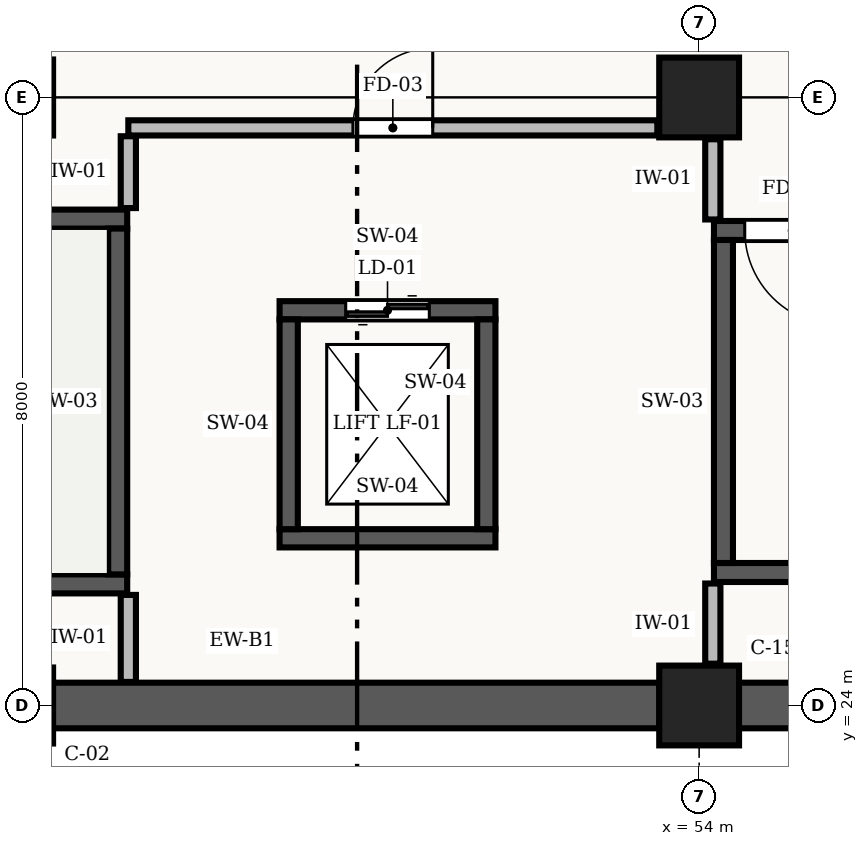
"""IFC4 building model, lengths in metres.
Left out: names, types, materials, properties, quantities, classifications, styles, units other than length and angle.
Written with IfcOpenShell. Run it as: python <this file> out.ifc"""

import sys

from ifc_helpers import new_model, si_unit, direction, frame, frame_2d, origin, origin_2d, place, context, subcontext, project, spatial, rectangle, extrude, element, fill, save


model = new_model("IFC4")
c1 = context("Model", 3, precision=1e-05, world=origin(), true_north=direction((0.0, 1.0)))
c2 = subcontext(c1, "Body", "Model", "MODEL_VIEW")
j1 = project(units=[si_unit("LENGTHUNIT", "METRE"), si_unit("PLANEANGLEUNIT", "RADIAN")], contexts=[c1])
p1 = place(None, origin())
s1 = spatial("IfcSite", under=j1, at=p1, CompositionType="ELEMENT")
p2 = place(p1, origin())
s2 = spatial("IfcBuilding", under=s1, at=p2, CompositionType="ELEMENT")
p3 = place(p2, frame((0.0, 0.0, -12.0)))
s3 = spatial("IfcBuildingStorey", under=s2, at=p3, CompositionType="ELEMENT", Elevation=-12.0)
for number, where, z_axis, x_axis in (
    (1, (45.0, 24.0, 0.0), (0.0, 0.0, 1.0), (1.0, 0.0, 0.0)),
    (2, (45.0, 32.0, 0.0), (0.0, 0.0, 1.0), (1.0, 0.0, 0.0)),
):
    element("IfcColumn", number, at=place(p3, frame(where, z_axis=z_axis, x_axis=x_axis)), inside=s3, PredefinedType="COLUMN", context=c2, shape_type="SweptSolid", body=[
        extrude(rectangle(XDim=1.0, YDim=1.0, at=origin_2d()), origin(), (0.0, 0.0, 1.0), 6.0),
    ])
for number, where, z_axis, x_axis in (
    (3, (54.0, 24.0, 0.0), (0.0, 0.0, 1.0), (1.0, 0.0, 0.0)),
    (4, (54.0, 32.0, 0.0), (0.0, 0.0, 1.0), (1.0, 0.0, 0.0)),
):
    element("IfcColumn", number, at=place(p3, frame(where, z_axis=z_axis, x_axis=x_axis)), inside=s3, PredefinedType="COLUMN", context=c2, shape_type="SweptSolid", body=[
        extrude(rectangle(XDim=1.05, YDim=1.05, at=origin_2d()), origin(), (0.0, 0.0, 1.0), 6.0),
    ])
for number, where, z_axis, x_axis in (
    (5, (62.502, 24.0, 0.0), (0.0, 0.0, 1.0), (-1.0, 0.0, 0.0)),
    (6, (53.477, 24.0, 0.0), (0.0, 0.0, 1.0), (-1.0, 0.0, 0.0)),
):
    element("IfcWall", number, at=place(p3, frame(where, z_axis=z_axis, x_axis=x_axis)), inside=s3, PredefinedType="STANDARD", context=c2, shape_type="SweptSolid", body=[
        extrude(rectangle(XDim=7.979, YDim=0.6, at=frame_2d((3.99, 0.0))), origin(), (0.0, 0.0, 1.0), 5.54),
    ])
p4 = place(p3, frame((36.975, 25.6, 0.0), z_axis=(0.0, 0.0, 1.0), x_axis=(1.0, 0.0, 0.0)))
e7 = element("IfcWall", 7, at=p4, inside=s3, PredefinedType="SHEAR", context=c2, shape_type="SweptSolid", body=[
    extrude(rectangle(XDim=9.5, YDim=0.25, at=frame_2d((4.75, 0.0))), origin(), (0.0, 0.0, 1.0), 5.53),
])
p5 = place(p3, frame((46.475, 30.4, 0.0), z_axis=(0.0, 0.0, 1.0), x_axis=(-1.0, 0.0, 0.0)))
e8 = element("IfcWall", 8, at=p5, inside=s3, PredefinedType="SHEAR", context=c2, shape_type="SweptSolid", body=[
    extrude(rectangle(XDim=9.5, YDim=0.25, at=frame_2d((4.75, 0.0))), origin(), (0.0, 0.0, 1.0), 5.53),
])
p6 = place(p5, frame((7.805, 0.0, 0.0)))
e9 = element("IfcOpeningElement", 9, at=p6, cuts=e8, PredefinedType="OPENING", context=c2, shape_type="SweptSolid", body=[
    extrude(rectangle(XDim=1.25, YDim=2.15, at=frame_2d((0.625, 1.075))), frame((0.0, 0.137, 0.0), z_axis=(0.0, -1.0, 0.0), x_axis=(1.0, 0.0, 0.0)), (0.0, 0.0, 1.0), 0.274),
])
p7 = place(p3, frame((46.35, 25.725, 0.0), z_axis=(0.0, 0.0, 1.0), x_axis=(0.0, 1.0, 0.0)))
e10 = element("IfcWall", 10, at=p7, inside=s3, PredefinedType="SHEAR", context=c2, shape_type="SweptSolid", body=[
    extrude(rectangle(XDim=4.55, YDim=0.25, at=frame_2d((2.275, 0.0))), origin(), (0.0, 0.0, 1.0), 5.53),
])
p8 = place(p3, frame((54.195, 25.75, 0.0), z_axis=(0.0, 0.0, 1.0), x_axis=(1.0, 0.0, 0.0)))
e11 = element("IfcWall", 11, at=p8, inside=s3, PredefinedType="SHEAR", context=c2, shape_type="SweptSolid", body=[
    extrude(rectangle(XDim=8.49, YDim=0.25, at=frame_2d((4.245, 0.0))), origin(), (0.0, 0.0, 1.0), 5.53),
])
p9 = place(p3, frame((62.685, 30.25, 0.0), z_axis=(0.0, 0.0, 1.0), x_axis=(-1.0, 0.0, 0.0)))
e12 = element("IfcWall", 12, at=p9, inside=s3, PredefinedType="SHEAR", context=c2, shape_type="SweptSolid", body=[
    extrude(rectangle(XDim=8.49, YDim=0.25, at=frame_2d((4.245, 0.0))), origin(), (0.0, 0.0, 1.0), 5.53),
])
p10 = place(p9, frame((6.835, 0.0, 0.0)))
e13 = element("IfcOpeningElement", 13, at=p10, cuts=e12, PredefinedType="OPENING", context=c2, shape_type="SweptSolid", body=[
    extrude(rectangle(XDim=1.25, YDim=2.15, at=frame_2d((0.625, 1.075))), frame((0.0, 0.137, 0.0), z_axis=(0.0, -1.0, 0.0), x_axis=(1.0, 0.0, 0.0)), (0.0, 0.0, 1.0), 0.274),
])
p11 = place(p3, frame((54.32, 30.125, 0.0), z_axis=(0.0, 0.0, 1.0), x_axis=(0.0, -1.0, 0.0)))
e14 = element("IfcWall", 14, at=p11, inside=s3, PredefinedType="SHEAR", context=c2, shape_type="SweptSolid", body=[
    extrude(rectangle(XDim=4.25, YDim=0.25, at=frame_2d((2.125, 0.0))), origin(), (0.0, 0.0, 1.0), 5.53),
])
p12 = place(p3, frame((48.48, 26.2, 0.0), z_axis=(0.0, 0.0, 1.0), x_axis=(1.0, 0.0, 0.0)))
e15 = element("IfcWall", 15, at=p12, inside=s3, PredefinedType="SHEAR", context=c2, shape_type="SweptSolid", body=[
    extrude(rectangle(XDim=2.84, YDim=0.24, at=frame_2d((1.42, 0.0))), origin(), (0.0, 0.0, 1.0), 5.53),
])
p13 = place(p3, frame((51.32, 29.2, 0.0), z_axis=(0.0, 0.0, 1.0), x_axis=(-1.0, 0.0, 0.0)))
e16 = element("IfcWall", 16, at=p13, inside=s3, PredefinedType="SHEAR", context=c2, shape_type="SweptSolid", body=[
    extrude(rectangle(XDim=2.84, YDim=0.24, at=frame_2d((1.42, 0.0))), origin(), (0.0, 0.0, 1.0), 5.53),
])
p14 = place(p13, frame((0.87, 0.0, 0.0)))
e17 = element("IfcOpeningElement", 17, at=p14, cuts=e16, PredefinedType="OPENING", context=c2, shape_type="SweptSolid", body=[
    extrude(rectangle(XDim=1.1, YDim=2.2, at=frame_2d((0.55, 1.1))), frame((0.0, 0.132, 0.0), z_axis=(0.0, -1.0, 0.0), x_axis=(1.0, 0.0, 0.0)), (0.0, 0.0, 1.0), 0.264),
])
for number, where, z_axis, x_axis in (
    (18, (48.6, 29.08, 0.0), (0.0, 0.0, 1.0), (0.0, -1.0, 0.0)),
    (19, (51.2, 26.32, 0.0), (0.0, 0.0, 1.0), (0.0, 1.0, 0.0)),
):
    element("IfcWall", number, at=place(p3, frame(where, z_axis=z_axis, x_axis=x_axis)), inside=s3, PredefinedType="SHEAR", context=c2, shape_type="SweptSolid", body=[
        extrude(rectangle(XDim=2.76, YDim=0.24, at=frame_2d((1.38, 0.0))), origin(), (0.0, 0.0, 1.0), 5.53),
    ])
p15 = place(p3, frame((46.49, 31.6, 0.0), z_axis=(0.0, 0.0, 1.0), x_axis=(1.0, 0.0, 0.0)))
e20 = element("IfcWall", 20, at=p15, inside=s3, PredefinedType="STANDARD", context=c2, shape_type="SweptSolid", body=[
    extrude(rectangle(XDim=6.96, YDim=0.2, at=frame_2d((3.48, 0.0))), origin(), (0.0, 0.0, 1.0), 5.53),
])
p16 = place(p15, frame((2.955, 0.0, 0.0)))
e21 = element("IfcOpeningElement", 21, at=p16, cuts=e20, PredefinedType="OPENING", context=c2, shape_type="SweptSolid", body=[
    extrude(rectangle(XDim=1.05, YDim=2.15, at=frame_2d((0.525, 1.075))), frame((0.0, 0.112, 0.0), z_axis=(0.0, -1.0, 0.0), x_axis=(1.0, 0.0, 0.0)), (0.0, 0.0, 1.0), 0.224),
])
p17 = place(p3, frame((46.49, 24.31, 0.0), z_axis=(0.0, 0.0, 1.0), x_axis=(0.0, 1.0, 0.0)))
e22 = element("IfcWall", 22, at=p17, inside=s3, PredefinedType="STANDARD", context=c2, shape_type="SweptSolid", body=[
    extrude(rectangle(XDim=1.145, YDim=0.2, at=frame_2d((0.573, 0.0))), origin(), (0.0, 0.0, 1.0), 5.53),
])
p18 = place(p3, frame((46.49, 30.545, 0.0), z_axis=(0.0, 0.0, 1.0), x_axis=(0.0, 1.0, 0.0)))
e23 = element("IfcWall", 23, at=p18, inside=s3, PredefinedType="STANDARD", context=c2, shape_type="SweptSolid", body=[
    extrude(rectangle(XDim=0.945, YDim=0.2, at=frame_2d((0.473, 0.0))), origin(), (0.0, 0.0, 1.0), 5.53),
])
for number, where, z_axis, x_axis in (
    (24, (54.18, 24.55, 0.0), (0.0, 0.0, 1.0), (0.0, 1.0, 0.0)),
    (25, (54.18, 30.395, 0.0), (0.0, 0.0, 1.0), (0.0, 1.0, 0.0)),
):
    element("IfcWall", number, at=place(p3, frame(where, z_axis=z_axis, x_axis=x_axis)), inside=s3, PredefinedType="STANDARD", context=c2, shape_type="SweptSolid", body=[
        extrude(rectangle(XDim=1.055, YDim=0.2, at=frame_2d((0.527, 0.0))), origin(), (0.0, 0.0, 1.0), 4.71),
    ])
p19 = place(p10, origin())
e26 = element("IfcDoor", 26, at=p19, inside=s3, OperationType="SINGLE_SWING_LEFT", PredefinedType="DOOR", context=c2, shape_type="SweptSolid", body=[
    extrude(rectangle(XDim=1.25, YDim=2.15, at=frame_2d((0.625, 1.075))), frame((0.0, 0.025, 0.0), z_axis=(0.0, -1.0, 0.0), x_axis=(1.0, 0.0, 0.0)), (0.0, 0.0, 1.0), 0.05),
])
fill(e13, e26)
p20 = place(p14, origin())
e27 = element("IfcDoor", 27, at=p20, inside=s3, OperationType="DOUBLE_DOOR_SLIDING", PredefinedType="DOOR", context=c2, shape_type="SweptSolid", body=[
    extrude(rectangle(XDim=1.1, YDim=2.2, at=frame_2d((0.55, 1.1))), frame((0.0, 0.025, 0.0), z_axis=(0.0, -1.0, 0.0), x_axis=(1.0, 0.0, 0.0)), (0.0, 0.0, 1.0), 0.05),
])
fill(e17, e27)
p21 = place(p16, origin())
e28 = element("IfcDoor", 28, at=p21, inside=s3, OperationType="SINGLE_SWING_RIGHT", PredefinedType="DOOR", context=c2, shape_type="SweptSolid", body=[
    extrude(rectangle(XDim=1.05, YDim=2.15, at=frame_2d((0.525, 1.075))), frame((0.0, 0.025, 0.0), z_axis=(0.0, -1.0, 0.0), x_axis=(1.0, 0.0, 0.0)), (0.0, 0.0, 1.0), 0.05),
])
fill(e21, e28)
save(model, sys.argv[1])
